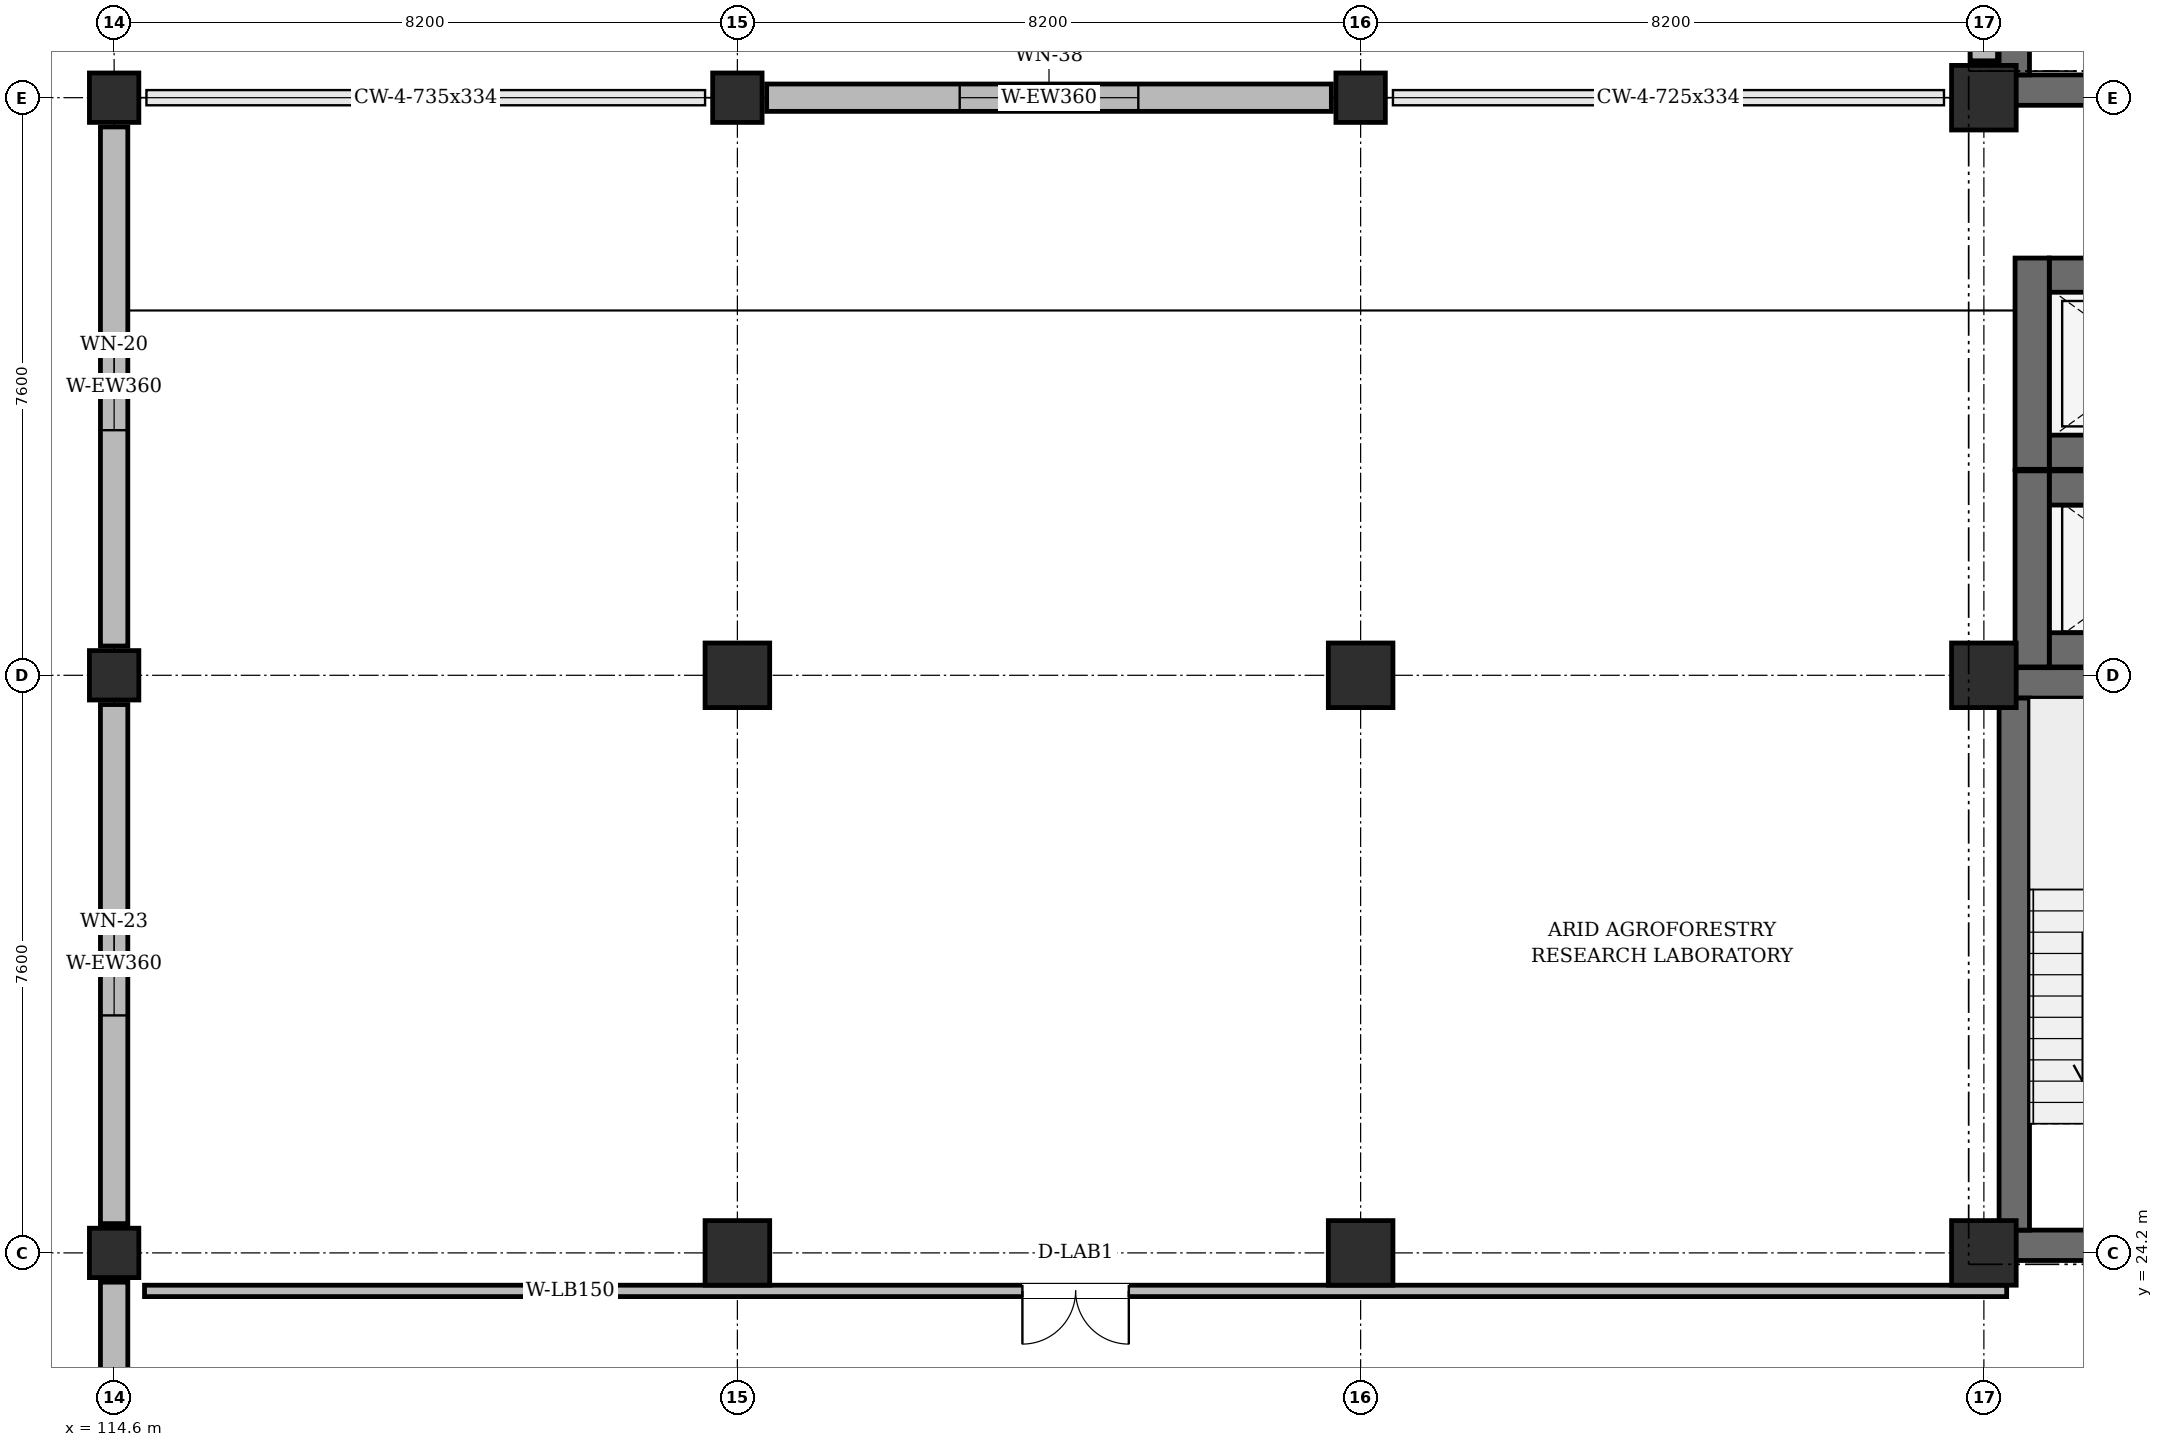
"""IFC4 building model, lengths in metres.
Left out: names, types, materials, properties, quantities, classifications, styles, units other than length and angle.
Written with IfcOpenShell. Run it as: python <this file> out.ifc"""

import sys

from ifc_helpers import new_model, si_unit, direction, frame, frame_2d, origin, origin_2d, place, context, subcontext, project, spatial, rectangle, extrude, element, fill, save


model = new_model("IFC4")
c1 = context("Model", 3, precision=1e-05, world=origin(), true_north=direction((0.0, 1.0)))
c2 = subcontext(c1, "Body", "Model", "MODEL_VIEW")
j1 = project(units=[si_unit("LENGTHUNIT", "METRE"), si_unit("PLANEANGLEUNIT", "RADIAN")], contexts=[c1])
p1 = place(None, origin())
s1 = spatial("IfcSite", under=j1, at=p1, CompositionType="ELEMENT")
p2 = place(p1, origin())
s2 = spatial("IfcBuilding", under=s1, at=p2, CompositionType="ELEMENT")
p3 = place(p2, frame((0.0, 0.0, 28.2)))
s3 = spatial("IfcBuildingStorey", under=s2, at=p3, CompositionType="ELEMENT", Elevation=28.2)
for number, where, z_axis, x_axis in (
    (1, (114.6, 24.2, 0.0), (0.0, 0.0, 1.0), (1.0, 0.0, 0.0)),
    (2, (114.6, 31.8, 0.0), (0.0, 0.0, 1.0), (1.0, 0.0, 0.0)),
    (3, (114.6, 39.4, 0.0), (0.0, 0.0, 1.0), (1.0, 0.0, 0.0)),
):
    element("IfcColumn", number, at=place(p3, frame(where, z_axis=z_axis, x_axis=x_axis)), inside=s3, PredefinedType="COLUMN", context=c2, shape_type="SweptSolid", body=[
        extrude(rectangle(XDim=0.65, YDim=0.65, at=origin_2d()), origin(), (0.0, 0.0, 1.0), 3.94),
    ])
for number, where, z_axis, x_axis in (
    (4, (122.8, 24.2, 0.0), (0.0, 0.0, 1.0), (1.0, 0.0, 0.0)),
    (5, (122.8, 31.8, 0.0), (0.0, 0.0, 1.0), (1.0, 0.0, 0.0)),
):
    element("IfcColumn", number, at=place(p3, frame(where, z_axis=z_axis, x_axis=x_axis)), inside=s3, PredefinedType="COLUMN", context=c2, shape_type="SweptSolid", body=[
        extrude(rectangle(XDim=0.85, YDim=0.85, at=origin_2d()), origin(), (0.0, 0.0, 1.0), 3.94),
    ])
p4 = place(p3, frame((122.8, 39.4, 0.0), z_axis=(0.0, 0.0, 1.0), x_axis=(1.0, 0.0, 0.0)))
e6 = element("IfcColumn", 6, at=p4, inside=s3, PredefinedType="COLUMN", context=c2, shape_type="SweptSolid", body=[
    extrude(rectangle(XDim=0.65, YDim=0.65, at=origin_2d()), origin(), (0.0, 0.0, 1.0), 3.94),
])
for number, where, z_axis, x_axis in (
    (7, (131.0, 24.2, 0.0), (0.0, 0.0, 1.0), (1.0, 0.0, 0.0)),
    (8, (131.0, 31.8, 0.0), (0.0, 0.0, 1.0), (1.0, 0.0, 0.0)),
):
    element("IfcColumn", number, at=place(p3, frame(where, z_axis=z_axis, x_axis=x_axis)), inside=s3, PredefinedType="COLUMN", context=c2, shape_type="SweptSolid", body=[
        extrude(rectangle(XDim=0.85, YDim=0.85, at=origin_2d()), origin(), (0.0, 0.0, 1.0), 3.94),
    ])
p5 = place(p3, frame((131.0, 39.4, 0.0), z_axis=(0.0, 0.0, 1.0), x_axis=(1.0, 0.0, 0.0)))
e9 = element("IfcColumn", 9, at=p5, inside=s3, PredefinedType="COLUMN", context=c2, shape_type="SweptSolid", body=[
    extrude(rectangle(XDim=0.65, YDim=0.65, at=origin_2d()), origin(), (0.0, 0.0, 1.0), 3.94),
])
for number, where, z_axis, x_axis in (
    (10, (139.2, 24.2, 0.0), (0.0, 0.0, 1.0), (1.0, 0.0, 0.0)),
    (11, (139.2, 31.8, 0.0), (0.0, 0.0, 1.0), (1.0, 0.0, 0.0)),
    (12, (139.2, 39.4, 0.0), (0.0, 0.0, 1.0), (1.0, 0.0, 0.0)),
):
    element("IfcColumn", number, at=place(p3, frame(where, z_axis=z_axis, x_axis=x_axis)), inside=s3, PredefinedType="COLUMN", context=c2, shape_type="SweptSolid", body=[
        extrude(rectangle(XDim=0.85, YDim=0.85, at=origin_2d()), origin(), (0.0, 0.0, 1.0), 3.94),
    ])
p6 = place(p3, frame((139.2, 46.515, 0.0), z_axis=(0.0, 0.0, 1.0), x_axis=(0.0, -1.0, 0.0)))
e13 = element("IfcWall", 13, at=p6, inside=s3, PredefinedType="SOLIDWALL", context=c2, shape_type="SweptSolid", body=[
    extrude(rectangle(XDim=6.63, YDim=0.36, at=frame_2d((3.315, 0.0))), origin(), (0.0, 0.0, 1.0), 3.325),
])
p7 = place(p3, frame((130.615, 39.4, 0.0), z_axis=(0.0, 0.0, 1.0), x_axis=(-1.0, 0.0, 0.0)))
e14 = element("IfcWall", 14, at=p7, inside=s3, PredefinedType="SOLIDWALL", context=c2, shape_type="SweptSolid", body=[
    extrude(rectangle(XDim=7.43, YDim=0.36, at=frame_2d((3.715, 0.0))), origin(), (0.0, 0.0, 1.0), 3.325),
])
p8 = place(p7, frame((2.54, 0.0, 0.95)))
e15 = element("IfcOpeningElement", 15, at=p8, cuts=e14, PredefinedType="OPENING", context=c2, shape_type="SweptSolid", body=[
    extrude(rectangle(XDim=2.35, YDim=1.5, at=frame_2d((1.175, 0.75))), frame((0.0, 0.192, 0.0), z_axis=(0.0, -1.0, 0.0), x_axis=(1.0, 0.0, 0.0)), (0.0, 0.0, 1.0), 0.384),
])
p9 = place(p3, frame((114.6, 39.015, 0.0), z_axis=(0.0, 0.0, 1.0), x_axis=(0.0, -1.0, 0.0)))
e16 = element("IfcWall", 16, at=p9, inside=s3, PredefinedType="SOLIDWALL", context=c2, shape_type="SweptSolid", body=[
    extrude(rectangle(XDim=6.83, YDim=0.36, at=frame_2d((3.415, 0.0))), origin(), (0.0, 0.0, 1.0), 3.325),
])
p10 = place(p9, frame((2.84, 0.0, 0.95)))
e17 = element("IfcOpeningElement", 17, at=p10, cuts=e16, PredefinedType="OPENING", context=c2, shape_type="SweptSolid", body=[
    extrude(rectangle(XDim=1.15, YDim=2.05, at=frame_2d((0.575, 1.025))), frame((0.0, 0.192, 0.0), z_axis=(0.0, -1.0, 0.0), x_axis=(1.0, 0.0, 0.0)), (0.0, 0.0, 1.0), 0.384),
])
p11 = place(p3, frame((114.6, 31.415, 0.0), z_axis=(0.0, 0.0, 1.0), x_axis=(0.0, -1.0, 0.0)))
e18 = element("IfcWall", 18, at=p11, inside=s3, PredefinedType="SOLIDWALL", context=c2, shape_type="SweptSolid", body=[
    extrude(rectangle(XDim=6.83, YDim=0.36, at=frame_2d((3.415, 0.0))), origin(), (0.0, 0.0, 1.0), 3.325),
])
p12 = place(p11, frame((2.74, 0.0, 0.95)))
e19 = element("IfcOpeningElement", 19, at=p12, cuts=e18, PredefinedType="OPENING", context=c2, shape_type="SweptSolid", body=[
    extrude(rectangle(XDim=1.35, YDim=1.75, at=frame_2d((0.675, 0.875))), frame((0.0, 0.192, 0.0), z_axis=(0.0, -1.0, 0.0), x_axis=(1.0, 0.0, 0.0)), (0.0, 0.0, 1.0), 0.384),
])
p13 = place(p3, frame((114.6, 23.815, 0.0), z_axis=(0.0, 0.0, 1.0), x_axis=(0.0, -1.0, 0.0)))
e20 = element("IfcWall", 20, at=p13, inside=s3, PredefinedType="SOLIDWALL", context=c2, shape_type="SweptSolid", body=[
    extrude(rectangle(XDim=6.83, YDim=0.36, at=frame_2d((3.415, 0.0))), origin(), (0.0, 0.0, 1.0), 3.325),
])
p14 = place(p13, frame((2.64, 0.0, 0.95)))
e21 = element("IfcOpeningElement", 21, at=p14, cuts=e20, PredefinedType="OPENING", context=c2, shape_type="SweptSolid", body=[
    extrude(rectangle(XDim=1.55, YDim=1.5, at=frame_2d((0.775, 0.75))), frame((0.0, 0.192, 0.0), z_axis=(0.0, -1.0, 0.0), x_axis=(1.0, 0.0, 0.0)), (0.0, 0.0, 1.0), 0.384),
])
p15 = place(p3, frame((139.4, 24.3, 0.0), z_axis=(0.0, 0.0, 1.0), x_axis=(1.0, 0.0, 0.0)))
e22 = element("IfcWall", 22, at=p15, inside=s3, PredefinedType="SHEAR", context=c2, shape_type="SweptSolid", body=[
    extrude(rectangle(XDim=3.8, YDim=0.4, at=frame_2d((1.9, 0.0))), origin(), (0.0, 0.0, 1.0), 3.94),
])
p16 = place(p15, frame((1.3, 0.0, 0.0)))
e23 = element("IfcOpeningElement", 23, at=p16, cuts=e22, PredefinedType="OPENING", context=c2, shape_type="SweptSolid", body=[
    extrude(rectangle(XDim=1.2, YDim=2.2, at=frame_2d((0.6, 1.1))), frame((0.0, 0.212, 0.0), z_axis=(0.0, -1.0, 0.0), x_axis=(1.0, 0.0, 0.0)), (0.0, 0.0, 1.0), 0.424),
])
p17 = place(p3, frame((139.4, 31.7, 0.0), z_axis=(0.0, 0.0, 1.0), x_axis=(1.0, 0.0, 0.0)))
e24 = element("IfcWall", 24, at=p17, inside=s3, PredefinedType="SHEAR", context=c2, shape_type="SweptSolid", body=[
    extrude(rectangle(XDim=3.8, YDim=0.4, at=frame_2d((1.9, 0.0))), origin(), (0.0, 0.0, 1.0), 3.94),
])
p18 = place(p3, frame((139.6, 24.5, 0.0), z_axis=(0.0, 0.0, 1.0), x_axis=(0.0, 1.0, 0.0)))
e25 = element("IfcWall", 25, at=p18, inside=s3, PredefinedType="SHEAR", context=c2, shape_type="SweptSolid", body=[
    extrude(rectangle(XDim=7.0, YDim=0.4, at=frame_2d((3.5, 0.0))), origin(), (0.0, 0.0, 1.0), 3.94),
])
p19 = place(p3, frame((139.4, 39.5, 0.0), z_axis=(0.0, 0.0, 1.0), x_axis=(1.0, 0.0, 0.0)))
e26 = element("IfcWall", 26, at=p19, inside=s3, PredefinedType="SHEAR", context=c2, shape_type="SweptSolid", body=[
    extrude(rectangle(XDim=3.8, YDim=0.4, at=frame_2d((1.9, 0.0))), origin(), (0.0, 0.0, 1.0), 3.94),
])
p20 = place(p19, frame((1.3, 0.0, 0.0)))
e27 = element("IfcOpeningElement", 27, at=p20, cuts=e26, PredefinedType="OPENING", context=c2, shape_type="SweptSolid", body=[
    extrude(rectangle(XDim=1.2, YDim=2.2, at=frame_2d((0.6, 1.1))), frame((0.0, 0.212, 0.0), z_axis=(0.0, -1.0, 0.0), x_axis=(1.0, 0.0, 0.0)), (0.0, 0.0, 1.0), 0.424),
])
p21 = place(p3, frame((139.6, 39.7, 0.0), z_axis=(0.0, 0.0, 1.0), x_axis=(0.0, 1.0, 0.0)))
e28 = element("IfcWall", 28, at=p21, inside=s3, PredefinedType="SHEAR", context=c2, shape_type="SweptSolid", body=[
    extrude(rectangle(XDim=7.0, YDim=0.4, at=frame_2d((3.5, 0.0))), origin(), (0.0, 0.0, 1.0), 3.94),
])
for number, where, z_axis, x_axis in (
    (29, (140.06, 32.135, 0.0), (0.0, 0.0, 1.0), (1.0, 0.0, 0.0)),
    (30, (140.06, 34.265, 0.0), (0.0, 0.0, 1.0), (1.0, 0.0, 0.0)),
):
    element("IfcWall", number, at=place(p3, frame(where, z_axis=z_axis, x_axis=x_axis)), inside=s3, PredefinedType="SHEAR", context=c2, shape_type="SweptSolid", body=[
        extrude(rectangle(XDim=2.74, YDim=0.45, at=frame_2d((1.37, 0.0))), origin(), (0.0, 0.0, 1.0), 3.94),
    ])
p22 = place(p3, frame((139.835, 31.91, 0.0), z_axis=(0.0, 0.0, 1.0), x_axis=(0.0, 1.0, 0.0)))
e31 = element("IfcWall", 31, at=p22, inside=s3, PredefinedType="SHEAR", context=c2, shape_type="SweptSolid", body=[
    extrude(rectangle(XDim=2.58, YDim=0.45, at=frame_2d((1.29, 0.0))), origin(), (0.0, 0.0, 1.0), 3.94),
])
for number, where, z_axis, x_axis in (
    (32, (140.06, 34.735, 0.0), (0.0, 0.0, 1.0), (1.0, 0.0, 0.0)),
    (33, (140.06, 37.065, 0.0), (0.0, 0.0, 1.0), (1.0, 0.0, 0.0)),
):
    element("IfcWall", number, at=place(p3, frame(where, z_axis=z_axis, x_axis=x_axis)), inside=s3, PredefinedType="SHEAR", context=c2, shape_type="SweptSolid", body=[
        extrude(rectangle(XDim=2.74, YDim=0.45, at=frame_2d((1.37, 0.0))), origin(), (0.0, 0.0, 1.0), 3.94),
    ])
p23 = place(p3, frame((139.835, 34.51, 0.0), z_axis=(0.0, 0.0, 1.0), x_axis=(0.0, 1.0, 0.0)))
e34 = element("IfcWall", 34, at=p23, inside=s3, PredefinedType="SHEAR", context=c2, shape_type="SweptSolid", body=[
    extrude(rectangle(XDim=2.78, YDim=0.45, at=frame_2d((1.39, 0.0))), origin(), (0.0, 0.0, 1.0), 3.94),
])
p24 = place(p3, frame((115.0, 23.7, 0.0), z_axis=(0.0, 0.0, 1.0), x_axis=(1.0, 0.0, 0.0)))
e35 = element("IfcWall", 35, at=p24, inside=s3, PredefinedType="PARTITIONING", context=c2, shape_type="SweptSolid", body=[
    extrude(rectangle(XDim=24.5, YDim=0.15, at=frame_2d((12.25, 0.0))), origin(), (0.0, 0.0, 1.0), 3.805),
])
p25 = place(p24, frame((11.55, 0.0, 0.0)))
e36 = element("IfcOpeningElement", 36, at=p25, cuts=e35, PredefinedType="OPENING", context=c2, shape_type="SweptSolid", body=[
    extrude(rectangle(XDim=1.4, YDim=2.2, at=frame_2d((0.7, 1.1))), frame((0.0, 0.087, 0.0), z_axis=(0.0, -1.0, 0.0), x_axis=(1.0, 0.0, 0.0)), (0.0, 0.0, 1.0), 0.174),
])
p26 = place(p8, origin())
e37 = element("IfcWindow", 37, at=p26, inside=s3, PartitioningType="DOUBLE_PANEL_VERTICAL", PredefinedType="WINDOW", context=c2, shape_type="SweptSolid", body=[
    extrude(rectangle(XDim=2.35, YDim=1.5, at=frame_2d((1.175, 0.75))), frame((0.0, 0.03, 0.0), z_axis=(0.0, -1.0, 0.0), x_axis=(1.0, 0.0, 0.0)), (0.0, 0.0, 1.0), 0.06),
])
fill(e15, e37)
p27 = place(p10, origin())
e38 = element("IfcWindow", 38, at=p27, inside=s3, PartitioningType="SINGLE_PANEL", PredefinedType="WINDOW", context=c2, shape_type="SweptSolid", body=[
    extrude(rectangle(XDim=1.15, YDim=2.05, at=frame_2d((0.575, 1.025))), frame((0.0, 0.03, 0.0), z_axis=(0.0, -1.0, 0.0), x_axis=(1.0, 0.0, 0.0)), (0.0, 0.0, 1.0), 0.06),
])
fill(e17, e38)
p28 = place(p12, origin())
e39 = element("IfcWindow", 39, at=p28, inside=s3, PartitioningType="SINGLE_PANEL", PredefinedType="WINDOW", context=c2, shape_type="SweptSolid", body=[
    extrude(rectangle(XDim=1.35, YDim=1.75, at=frame_2d((0.675, 0.875))), frame((0.0, 0.03, 0.0), z_axis=(0.0, -1.0, 0.0), x_axis=(1.0, 0.0, 0.0)), (0.0, 0.0, 1.0), 0.06),
])
fill(e19, e39)
p29 = place(p25, frame((1.4, 0.0, 0.0), z_axis=(0.0, 0.0, 1.0), x_axis=(-1.0, 0.0, 0.0)))
e40 = element("IfcDoor", 40, at=p29, inside=s3, OperationType="DOUBLE_DOOR_SINGLE_SWING", PredefinedType="DOOR", context=c2, shape_type="SweptSolid", body=[
    extrude(rectangle(XDim=1.4, YDim=2.2, at=frame_2d((0.7, 1.1))), frame((0.0, 0.025, 0.0), z_axis=(0.0, -1.0, 0.0), x_axis=(1.0, 0.0, 0.0)), (0.0, 0.0, 1.0), 0.05),
])
fill(e36, e40)
save(model, sys.argv[1])
